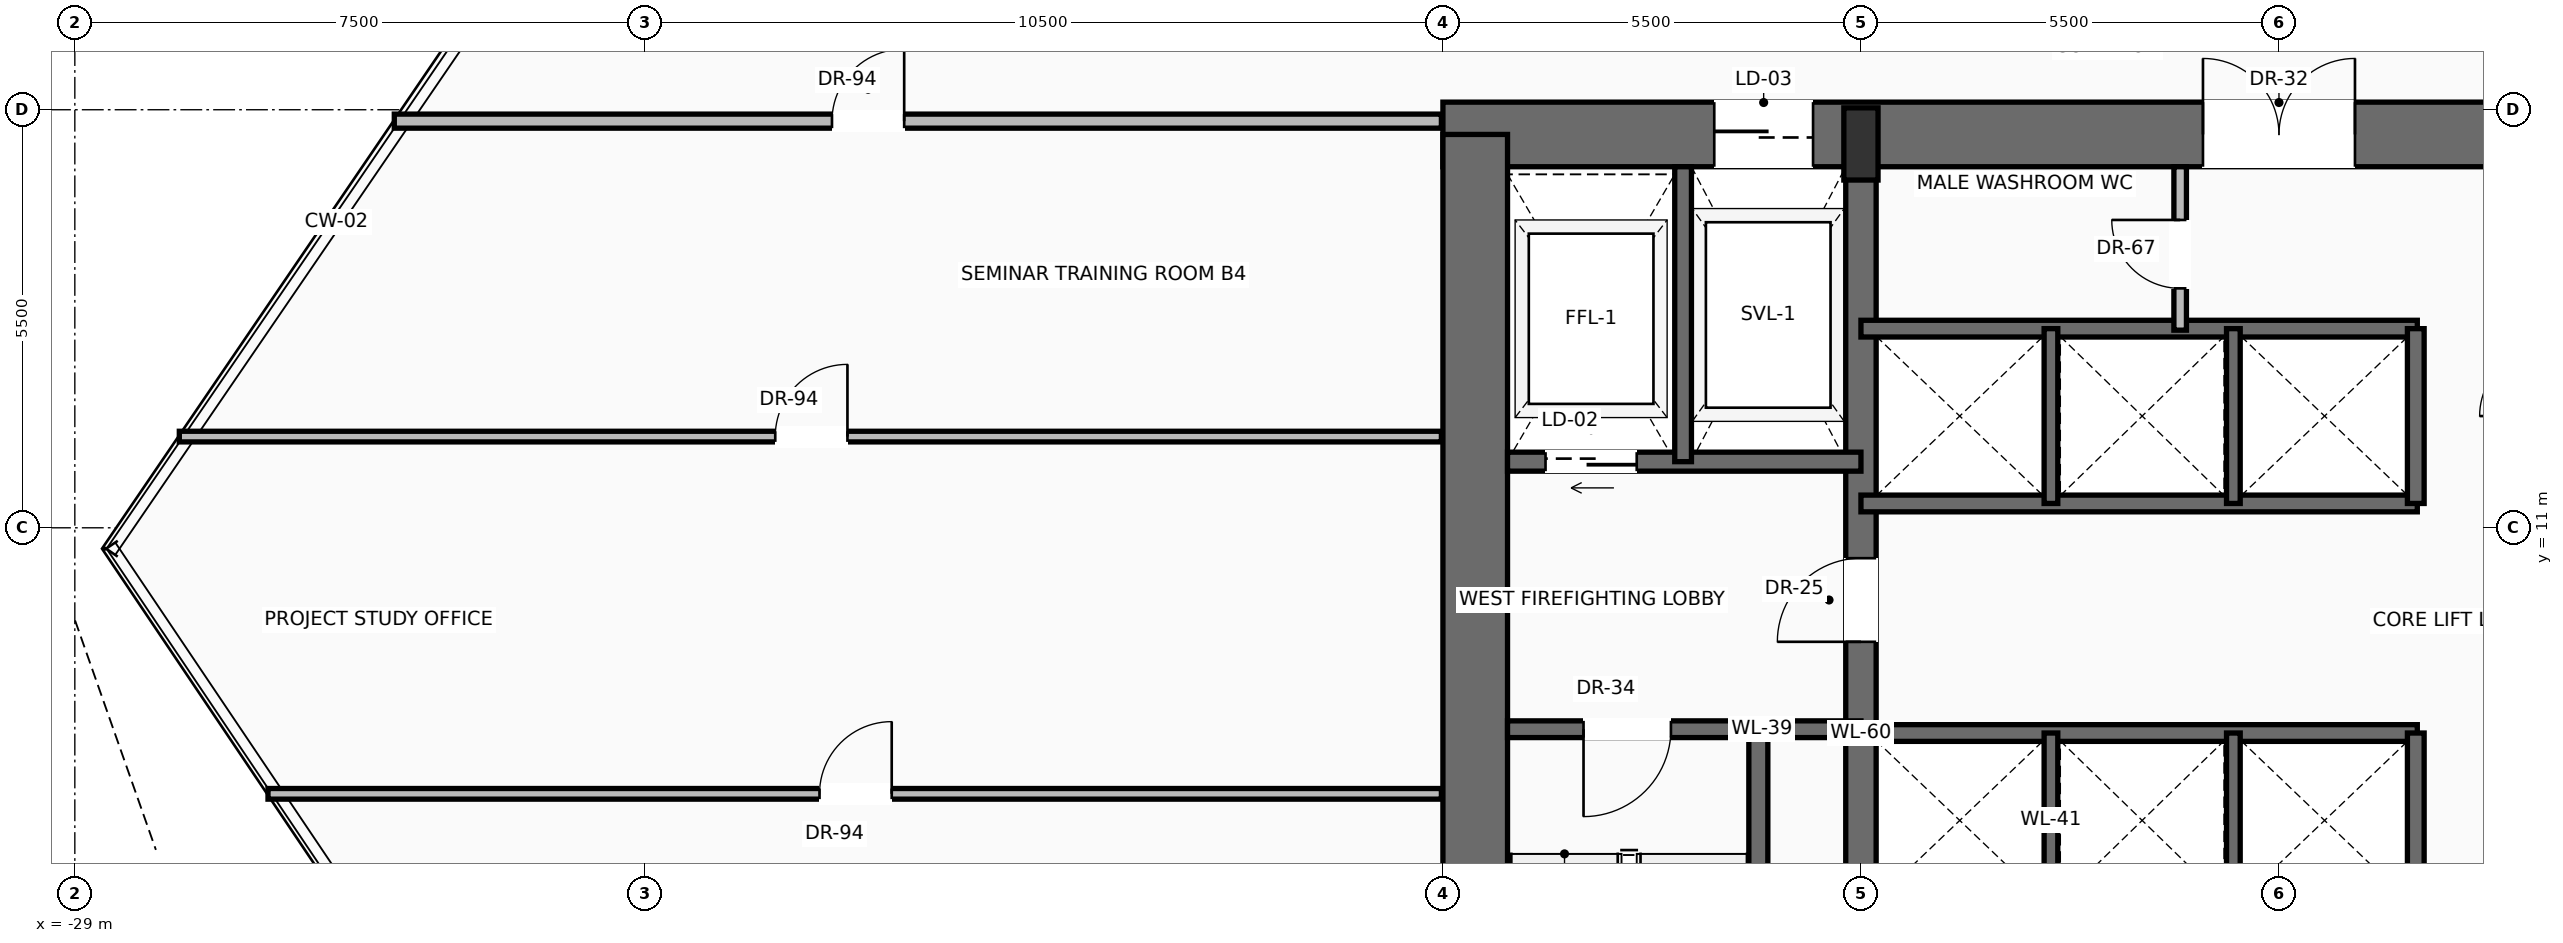
"""IFC4 building model, lengths in metres.
Left out: names, types, materials, properties, quantities, classifications, styles, units other than length and angle.
Written with IfcOpenShell. Run it as: python <this file> out.ifc"""

import sys

from ifc_helpers import new_model, si_unit, direction, frame, frame_2d, origin, origin_2d, place, context, subcontext, project, spatial, rectangle, extrude, source, transform, mapped, element, fill, save


model = new_model("IFC4")
c1 = context("Model", 3, precision=1e-05, world=origin(), true_north=direction((0.0, 1.0)))
c2 = subcontext(c1, "Body", "Model", "MODEL_VIEW")
j1 = project(units=[si_unit("LENGTHUNIT", "METRE"), si_unit("PLANEANGLEUNIT", "RADIAN")], contexts=[c1])
p1 = place(None, origin())
s1 = spatial("IfcSite", under=j1, at=p1, CompositionType="ELEMENT")
p2 = place(p1, origin())
s2 = spatial("IfcBuilding", under=s1, at=p2, CompositionType="ELEMENT")
p3 = place(p2, frame((0.0, 0.0, 42.3)))
s3 = spatial("IfcBuildingStorey", under=s2, at=p3, CompositionType="ELEMENT", Elevation=42.3)
p4 = place(p3, frame((-11.0, 16.175, 0.0), z_axis=(0.0, 0.0, 1.0), x_axis=(1.0, 0.0, 0.0)))
e1 = element("IfcWall", 1, at=p4, inside=s3, PredefinedType="SHEAR", context=c2, shape_type="SweptSolid", body=[
    extrude(rectangle(XDim=22.0, YDim=0.85, at=frame_2d((11.0, 0.0))), origin(), (0.0, 0.0, 1.0), 3.45),
])
p5 = place(p4, frame((3.57, 0.0, 0.0)))
e2 = element("IfcOpeningElement", 2, at=p5, cuts=e1, PredefinedType="OPENING", context=c2, shape_type="SweptSolid", body=[
    extrude(rectangle(XDim=1.3, YDim=2.3, at=frame_2d((0.65, 1.15))), frame((0.0, 0.435, 0.0), z_axis=(0.0, -1.0, 0.0), x_axis=(1.0, 0.0, 0.0)), (0.0, 0.0, 1.0), 0.87),
])
p6 = place(p4, frame((10.0, 0.0, 0.0)))
e3 = element("IfcOpeningElement", 3, at=p6, cuts=e1, PredefinedType="OPENING", context=c2, shape_type="SweptSolid", body=[
    extrude(rectangle(XDim=2.0, YDim=2.4, at=frame_2d((1.0, 1.2))), frame((0.0, 0.435, 0.0), z_axis=(0.0, -1.0, 0.0), x_axis=(1.0, 0.0, 0.0)), (0.0, 0.0, 1.0), 0.87),
])
p7 = place(p3, frame((-10.575, 0.425, 0.0), z_axis=(0.0, 0.0, 1.0), x_axis=(0.0, 1.0, 0.0)))
e4 = element("IfcWall", 4, at=p7, inside=s3, PredefinedType="SHEAR", context=c2, shape_type="SweptSolid", body=[
    extrude(rectangle(XDim=15.75, YDim=0.85, at=frame_2d((7.875, 0.0))), origin(), (0.0, 0.0, 1.0), 3.45),
])
p8 = place(p3, frame((-5.5, 0.425, 0.0), z_axis=(0.0, 0.0, 1.0), x_axis=(0.0, 1.0, 0.0)))
e5 = element("IfcWall", 5, at=p8, inside=s3, PredefinedType="SHEAR", context=c2, shape_type="SweptSolid", body=[
    extrude(rectangle(XDim=15.75, YDim=0.4, at=frame_2d((7.875, 0.0))), origin(), (0.0, 0.0, 1.0), 3.45),
])
p9 = place(p8, frame((9.075, 0.0, 0.0)))
e6 = element("IfcOpeningElement", 6, at=p9, cuts=e5, PredefinedType="OPENING", context=c2, shape_type="SweptSolid", body=[
    extrude(rectangle(XDim=1.1, YDim=2.2, at=frame_2d((0.55, 1.1))), frame((0.0, 0.21, 0.0), z_axis=(0.0, -1.0, 0.0), x_axis=(1.0, 0.0, 0.0)), (0.0, 0.0, 1.0), 0.42),
])
m1 = source(origin(), c2, "Body", "SweptSolid", [
    extrude(rectangle(XDim=0.45, YDim=0.95, at=origin_2d()), origin(), (0.0, 0.0, 1.0), 3.7),
])
p10 = place(p3, frame((-5.5, 16.05, 0.0), z_axis=(0.0, 0.0, 1.0), x_axis=(1.0, 0.0, 0.0)))
e7 = element("IfcColumn", 7, at=p10, inside=s3, PredefinedType="PILASTER", context=c2, shape_type="MappedRepresentation", body=[
    mapped(m1, transform((0.0, 0.0, 0.0), scale=1.0)),
])
p11 = place(p3, frame((-6.85, 0.85, 0.0), z_axis=(0.0, 0.0, 1.0), x_axis=(0.0, 1.0, 0.0)))
e8 = element("IfcWall", 8, at=p11, inside=s3, PredefinedType="SOLIDWALL", context=c2, shape_type="SweptSolid", body=[
    extrude(rectangle(XDim=7.5, YDim=0.25, at=frame_2d((3.75, 0.0))), origin(), (0.0, 0.0, 1.0), 3.45),
])
p12 = place(p3, frame((-5.5, 8.35, 0.0), z_axis=(0.0, 0.0, 1.0), x_axis=(-1.0, 0.0, 0.0)))
e9 = element("IfcWall", 9, at=p12, inside=s3, PredefinedType="SOLIDWALL", context=c2, shape_type="SweptSolid", body=[
    extrude(rectangle(XDim=4.65, YDim=0.22, at=frame_2d((2.325, 0.0))), origin(), (0.0, 0.0, 1.0), 3.45),
])
p13 = place(p12, frame((2.5, 0.0, 0.0)))
e10 = element("IfcOpeningElement", 10, at=p13, cuts=e9, PredefinedType="OPENING", context=c2, shape_type="SweptSolid", body=[
    extrude(rectangle(XDim=1.15, YDim=2.2, at=frame_2d((0.575, 1.1))), frame((0.0, 0.12, 0.0), z_axis=(0.0, -1.0, 0.0), x_axis=(1.0, 0.0, 0.0)), (0.0, 0.0, 1.0), 0.24),
])
p14 = place(p3, frame((-5.5, 11.87, 0.0), z_axis=(0.0, 0.0, 1.0), x_axis=(-1.0, 0.0, 0.0)))
e11 = element("IfcWall", 11, at=p14, inside=s3, PredefinedType="SOLIDWALL", context=c2, shape_type="SweptSolid", body=[
    extrude(rectangle(XDim=4.65, YDim=0.25, at=frame_2d((2.325, 0.0))), origin(), (0.0, 0.0, 1.0), 3.45),
])
p15 = place(p14, frame((2.95, 0.0, 0.0)))
e12 = element("IfcOpeningElement", 12, at=p15, cuts=e11, PredefinedType="OPENING", context=c2, shape_type="SweptSolid", body=[
    extrude(rectangle(XDim=1.2, YDim=2.25, at=frame_2d((0.6, 1.125))), frame((0.0, 0.135, 0.0), z_axis=(0.0, -1.0, 0.0), x_axis=(1.0, 0.0, 0.0)), (0.0, 0.0, 1.0), 0.27),
])
p16 = place(p3, frame((-7.84, 11.87, 0.0), z_axis=(0.0, 0.0, 1.0), x_axis=(0.0, 1.0, 0.0)))
e13 = element("IfcWall", 13, at=p16, inside=s3, PredefinedType="SOLIDWALL", context=c2, shape_type="SweptSolid", body=[
    extrude(rectangle(XDim=3.88, YDim=0.22, at=frame_2d((1.94, 0.0))), origin(), (0.0, 0.0, 1.0), 3.45),
])
p17 = place(p3, frame((-5.5, 8.3, 0.0), z_axis=(0.0, 0.0, 1.0), x_axis=(1.0, 0.0, 0.0)))
e14 = element("IfcWall", 14, at=p17, inside=s3, PredefinedType="SOLIDWALL", context=c2, shape_type="SweptSolid", body=[
    extrude(rectangle(XDim=7.32, YDim=0.22, at=frame_2d((3.66, 0.0))), origin(), (0.0, 0.0, 1.0), 3.45),
])
p18 = place(p3, frame((1.8, 6.0, 0.0), z_axis=(0.0, 0.0, 1.0), x_axis=(0.0, 1.0, 0.0)))
e15 = element("IfcWall", 15, at=p18, inside=s3, PredefinedType="SOLIDWALL", context=c2, shape_type="SweptSolid", body=[
    extrude(rectangle(XDim=2.3, YDim=0.22, at=frame_2d((1.15, 0.0))), origin(), (0.0, 0.0, 1.0), 3.45),
])
for number, where, z_axis, x_axis in (
    (16, (-3.0, 6.0, 0.0), (0.0, 0.0, 1.0), (0.0, 1.0, 0.0)),
    (17, (-0.6, 6.0, 0.0), (0.0, 0.0, 1.0), (0.0, 1.0, 0.0)),
):
    element("IfcWall", number, at=place(p3, frame(where, z_axis=z_axis, x_axis=x_axis)), inside=s3, PredefinedType="SOLIDWALL", context=c2, shape_type="SweptSolid", body=[
        extrude(rectangle(XDim=2.3, YDim=0.18, at=frame_2d((1.15, 0.0))), origin(), (0.0, 0.0, 1.0), 3.45),
    ])
for number, where, z_axis, x_axis in (
    (18, (-5.5, 11.32, 0.0), (0.0, 0.0, 1.0), (1.0, 0.0, 0.0)),
    (19, (-5.5, 13.62, 0.0), (0.0, 0.0, 1.0), (1.0, 0.0, 0.0)),
):
    element("IfcWall", number, at=place(p3, frame(where, z_axis=z_axis, x_axis=x_axis)), inside=s3, PredefinedType="SOLIDWALL", context=c2, shape_type="SweptSolid", body=[
        extrude(rectangle(XDim=7.32, YDim=0.22, at=frame_2d((3.66, 0.0))), origin(), (0.0, 0.0, 1.0), 3.45),
    ])
p19 = place(p3, frame((1.8, 11.32, 0.0), z_axis=(0.0, 0.0, 1.0), x_axis=(0.0, 1.0, 0.0)))
e20 = element("IfcWall", 20, at=p19, inside=s3, PredefinedType="SOLIDWALL", context=c2, shape_type="SweptSolid", body=[
    extrude(rectangle(XDim=2.3, YDim=0.22, at=frame_2d((1.15, 0.0))), origin(), (0.0, 0.0, 1.0), 3.45),
])
for number, where, z_axis, x_axis in (
    (21, (-3.0, 11.32, 0.0), (0.0, 0.0, 1.0), (0.0, 1.0, 0.0)),
    (22, (-0.6, 11.32, 0.0), (0.0, 0.0, 1.0), (0.0, 1.0, 0.0)),
):
    element("IfcWall", number, at=place(p3, frame(where, z_axis=z_axis, x_axis=x_axis)), inside=s3, PredefinedType="SOLIDWALL", context=c2, shape_type="SweptSolid", body=[
        extrude(rectangle(XDim=2.3, YDim=0.18, at=frame_2d((1.15, 0.0))), origin(), (0.0, 0.0, 1.0), 3.45),
    ])
p20 = place(p3, frame((-1.3, 13.6, 0.0), z_axis=(0.0, 0.0, 1.0), x_axis=(0.0, 1.0, 0.0)))
e23 = element("IfcWall", 23, at=p20, inside=s3, PredefinedType="PARTITIONING", context=c2, shape_type="SweptSolid", body=[
    extrude(rectangle(XDim=2.15, YDim=0.165, at=frame_2d((1.075, 0.0))), origin(), (0.0, 0.0, 1.0), 3.442),
])
p21 = place(p20, frame((0.55, 0.0, 0.0)))
e24 = element("IfcOpeningElement", 24, at=p21, cuts=e23, PredefinedType="OPENING", context=c2, shape_type="SweptSolid", body=[
    extrude(rectangle(XDim=0.9, YDim=2.1, at=frame_2d((0.45, 1.05))), frame((0.0, 0.093, 0.0), z_axis=(0.0, -1.0, 0.0), x_axis=(1.0, 0.0, 0.0)), (0.0, 0.0, 1.0), 0.185),
])
p22 = place(p3, frame((-24.797, 16.35, 0.0), z_axis=(0.0, 0.0, 1.0), x_axis=(1.0, 0.0, 0.0)))
e25 = element("IfcWall", 25, at=p22, inside=s3, PredefinedType="PARTITIONING", context=c2, shape_type="SweptSolid", body=[
    extrude(rectangle(XDim=13.777, YDim=0.185, at=frame_2d((6.888, 0.0))), origin(), (0.0, 0.0, 1.0), 2.747),
])
p23 = place(p22, frame((5.759, 0.0, 0.0)))
e26 = element("IfcOpeningElement", 26, at=p23, cuts=e25, PredefinedType="OPENING", context=c2, shape_type="SweptSolid", body=[
    extrude(rectangle(XDim=0.95, YDim=2.2, at=frame_2d((0.475, 1.1))), frame((0.0, 0.103, 0.0), z_axis=(0.0, -1.0, 0.0), x_axis=(1.0, 0.0, 0.0)), (0.0, 0.0, 1.0), 0.205),
])
p24 = place(p3, frame((-26.458, 7.5, 0.0), z_axis=(0.0, 0.0, 1.0), x_axis=(1.0, 0.0, 0.0)))
e27 = element("IfcWall", 27, at=p24, inside=s3, PredefinedType="PARTITIONING", context=c2, shape_type="SweptSolid", body=[
    extrude(rectangle(XDim=15.438, YDim=0.14, at=frame_2d((7.719, 0.0))), origin(), (0.0, 0.0, 1.0), 2.979),
])
p25 = place(p24, frame((7.256, 0.0, 0.0)))
e28 = element("IfcOpeningElement", 28, at=p25, cuts=e27, PredefinedType="OPENING", context=c2, shape_type="SweptSolid", body=[
    extrude(rectangle(XDim=0.95, YDim=2.2, at=frame_2d((0.475, 1.1))), frame((0.0, 0.08, 0.0), z_axis=(0.0, -1.0, 0.0), x_axis=(1.0, 0.0, 0.0)), (0.0, 0.0, 1.0), 0.16),
])
p26 = place(p3, frame((-27.625, 12.2, 0.0), z_axis=(0.0, 0.0, 1.0), x_axis=(1.0, 0.0, 0.0)))
e29 = element("IfcWall", 29, at=p26, inside=s3, PredefinedType="PARTITIONING", context=c2, shape_type="SweptSolid", body=[
    extrude(rectangle(XDim=16.605, YDim=0.14, at=frame_2d((8.303, 0.0))), origin(), (0.0, 0.0, 1.0), 3.442),
])
p27 = place(p26, frame((7.841, 0.0, 0.0)))
e30 = element("IfcOpeningElement", 30, at=p27, cuts=e29, PredefinedType="OPENING", context=c2, shape_type="SweptSolid", body=[
    extrude(rectangle(XDim=0.95, YDim=2.2, at=frame_2d((0.475, 1.1))), frame((0.0, 0.08, 0.0), z_axis=(0.0, -1.0, 0.0), x_axis=(1.0, 0.0, 0.0)), (0.0, 0.0, 1.0), 0.16),
])
m2 = source(origin(), c2, "Body", "SweptSolid", [
    extrude(rectangle(XDim=1.15, YDim=2.2, at=frame_2d((0.575, 1.1))), frame((0.0, 0.025, 0.0), z_axis=(0.0, -1.0, 0.0), x_axis=(1.0, 0.0, 0.0)), (0.0, 0.0, 1.0), 0.05),
])
p28 = place(p13, origin())
e31 = element("IfcDoor", 31, at=p28, inside=s3, OperationType="SINGLE_SWING_RIGHT", PredefinedType="DOOR", context=c2, shape_type="MappedRepresentation", body=[
    mapped(m2, transform((0.0, 0.0, 0.0), scale=1.0)),
])
fill(e10, e31)
m3 = source(origin(), c2, "Body", "SweptSolid", [
    extrude(rectangle(XDim=1.1, YDim=2.2, at=frame_2d((0.55, 1.1))), frame((0.0, 0.025, 0.0), z_axis=(0.0, -1.0, 0.0), x_axis=(1.0, 0.0, 0.0)), (0.0, 0.0, 1.0), 0.05),
])
p29 = place(p9, origin())
e32 = element("IfcDoor", 32, at=p29, inside=s3, OperationType="SINGLE_SWING_LEFT", PredefinedType="DOOR", context=c2, shape_type="MappedRepresentation", body=[
    mapped(m3, transform((0.0, 0.0, 0.0), scale=1.0)),
])
fill(e6, e32)
m4 = source(origin(), c2, "Body", "SweptSolid", [
    extrude(rectangle(XDim=1.2, YDim=2.25, at=frame_2d((0.6, 1.125))), frame((0.0, 0.025, 0.0), z_axis=(0.0, -1.0, 0.0), x_axis=(1.0, 0.0, 0.0)), (0.0, 0.0, 1.0), 0.05),
])
p30 = place(p15, origin())
e33 = element("IfcDoor", 33, at=p30, inside=s3, OperationType="SLIDING_TO_LEFT", PredefinedType="DOOR", context=c2, shape_type="MappedRepresentation", body=[
    mapped(m4, transform((0.0, 0.0, 0.0), scale=1.0)),
])
fill(e12, e33)
m5 = source(origin(), c2, "Body", "SweptSolid", [
    extrude(rectangle(XDim=1.3, YDim=2.3, at=frame_2d((0.65, 1.15))), frame((0.0, 0.025, 0.0), z_axis=(0.0, -1.0, 0.0), x_axis=(1.0, 0.0, 0.0)), (0.0, 0.0, 1.0), 0.05),
])
p31 = place(p5, origin())
e34 = element("IfcDoor", 34, at=p31, inside=s3, OperationType="SLIDING_TO_RIGHT", PredefinedType="DOOR", context=c2, shape_type="MappedRepresentation", body=[
    mapped(m5, transform((0.0, 0.0, 0.0), scale=1.0)),
])
fill(e2, e34)
m6 = source(origin(), c2, "Body", "SweptSolid", [
    extrude(rectangle(XDim=2.0, YDim=2.4, at=frame_2d((1.0, 1.2))), frame((0.0, 0.025, 0.0), z_axis=(0.0, -1.0, 0.0), x_axis=(1.0, 0.0, 0.0)), (0.0, 0.0, 1.0), 0.05),
])
p32 = place(p6, origin())
e35 = element("IfcDoor", 35, at=p32, inside=s3, OperationType="DOUBLE_DOOR_SINGLE_SWING", PredefinedType="DOOR", context=c2, shape_type="MappedRepresentation", body=[
    mapped(m6, transform((0.0, 0.0, 0.0), scale=1.0)),
])
fill(e3, e35)
m7 = source(origin(), c2, "Body", "SweptSolid", [
    extrude(rectangle(XDim=0.9, YDim=2.1, at=frame_2d((0.45, 1.05))), frame((0.0, 0.025, 0.0), z_axis=(0.0, -1.0, 0.0), x_axis=(1.0, 0.0, 0.0)), (0.0, 0.0, 1.0), 0.05),
])
p33 = place(p21, origin())
e36 = element("IfcDoor", 36, at=p33, inside=s3, OperationType="SINGLE_SWING_RIGHT", PredefinedType="DOOR", context=c2, shape_type="MappedRepresentation", body=[
    mapped(m7, transform((0.0, 0.0, 0.0), scale=1.0)),
])
fill(e24, e36)
m8 = source(origin(), c2, "Body", "SweptSolid", [
    extrude(rectangle(XDim=0.95, YDim=2.2, at=frame_2d((0.475, 1.1))), frame((0.0, 0.025, 0.0), z_axis=(0.0, -1.0, 0.0), x_axis=(1.0, 0.0, 0.0)), (0.0, 0.0, 1.0), 0.05),
])
p34 = place(p23, origin())
e37 = element("IfcDoor", 37, at=p34, inside=s3, OperationType="SINGLE_SWING_RIGHT", PredefinedType="DOOR", context=c2, shape_type="MappedRepresentation", body=[
    mapped(m8, transform((0.0, 0.0, 0.0), scale=1.0)),
])
fill(e26, e37)
p35 = place(p27, origin())
e38 = element("IfcDoor", 38, at=p35, inside=s3, OperationType="SINGLE_SWING_RIGHT", PredefinedType="DOOR", context=c2, shape_type="MappedRepresentation", body=[
    mapped(m8, transform((0.0, 0.0, 0.0), scale=1.0)),
])
fill(e30, e38)
p36 = place(p25, origin())
e39 = element("IfcDoor", 39, at=p36, inside=s3, OperationType="SINGLE_SWING_RIGHT", PredefinedType="DOOR", context=c2, shape_type="MappedRepresentation", body=[
    mapped(m8, transform((0.0, 0.0, 0.0), scale=1.0)),
])
fill(e28, e39)
save(model, sys.argv[1])
